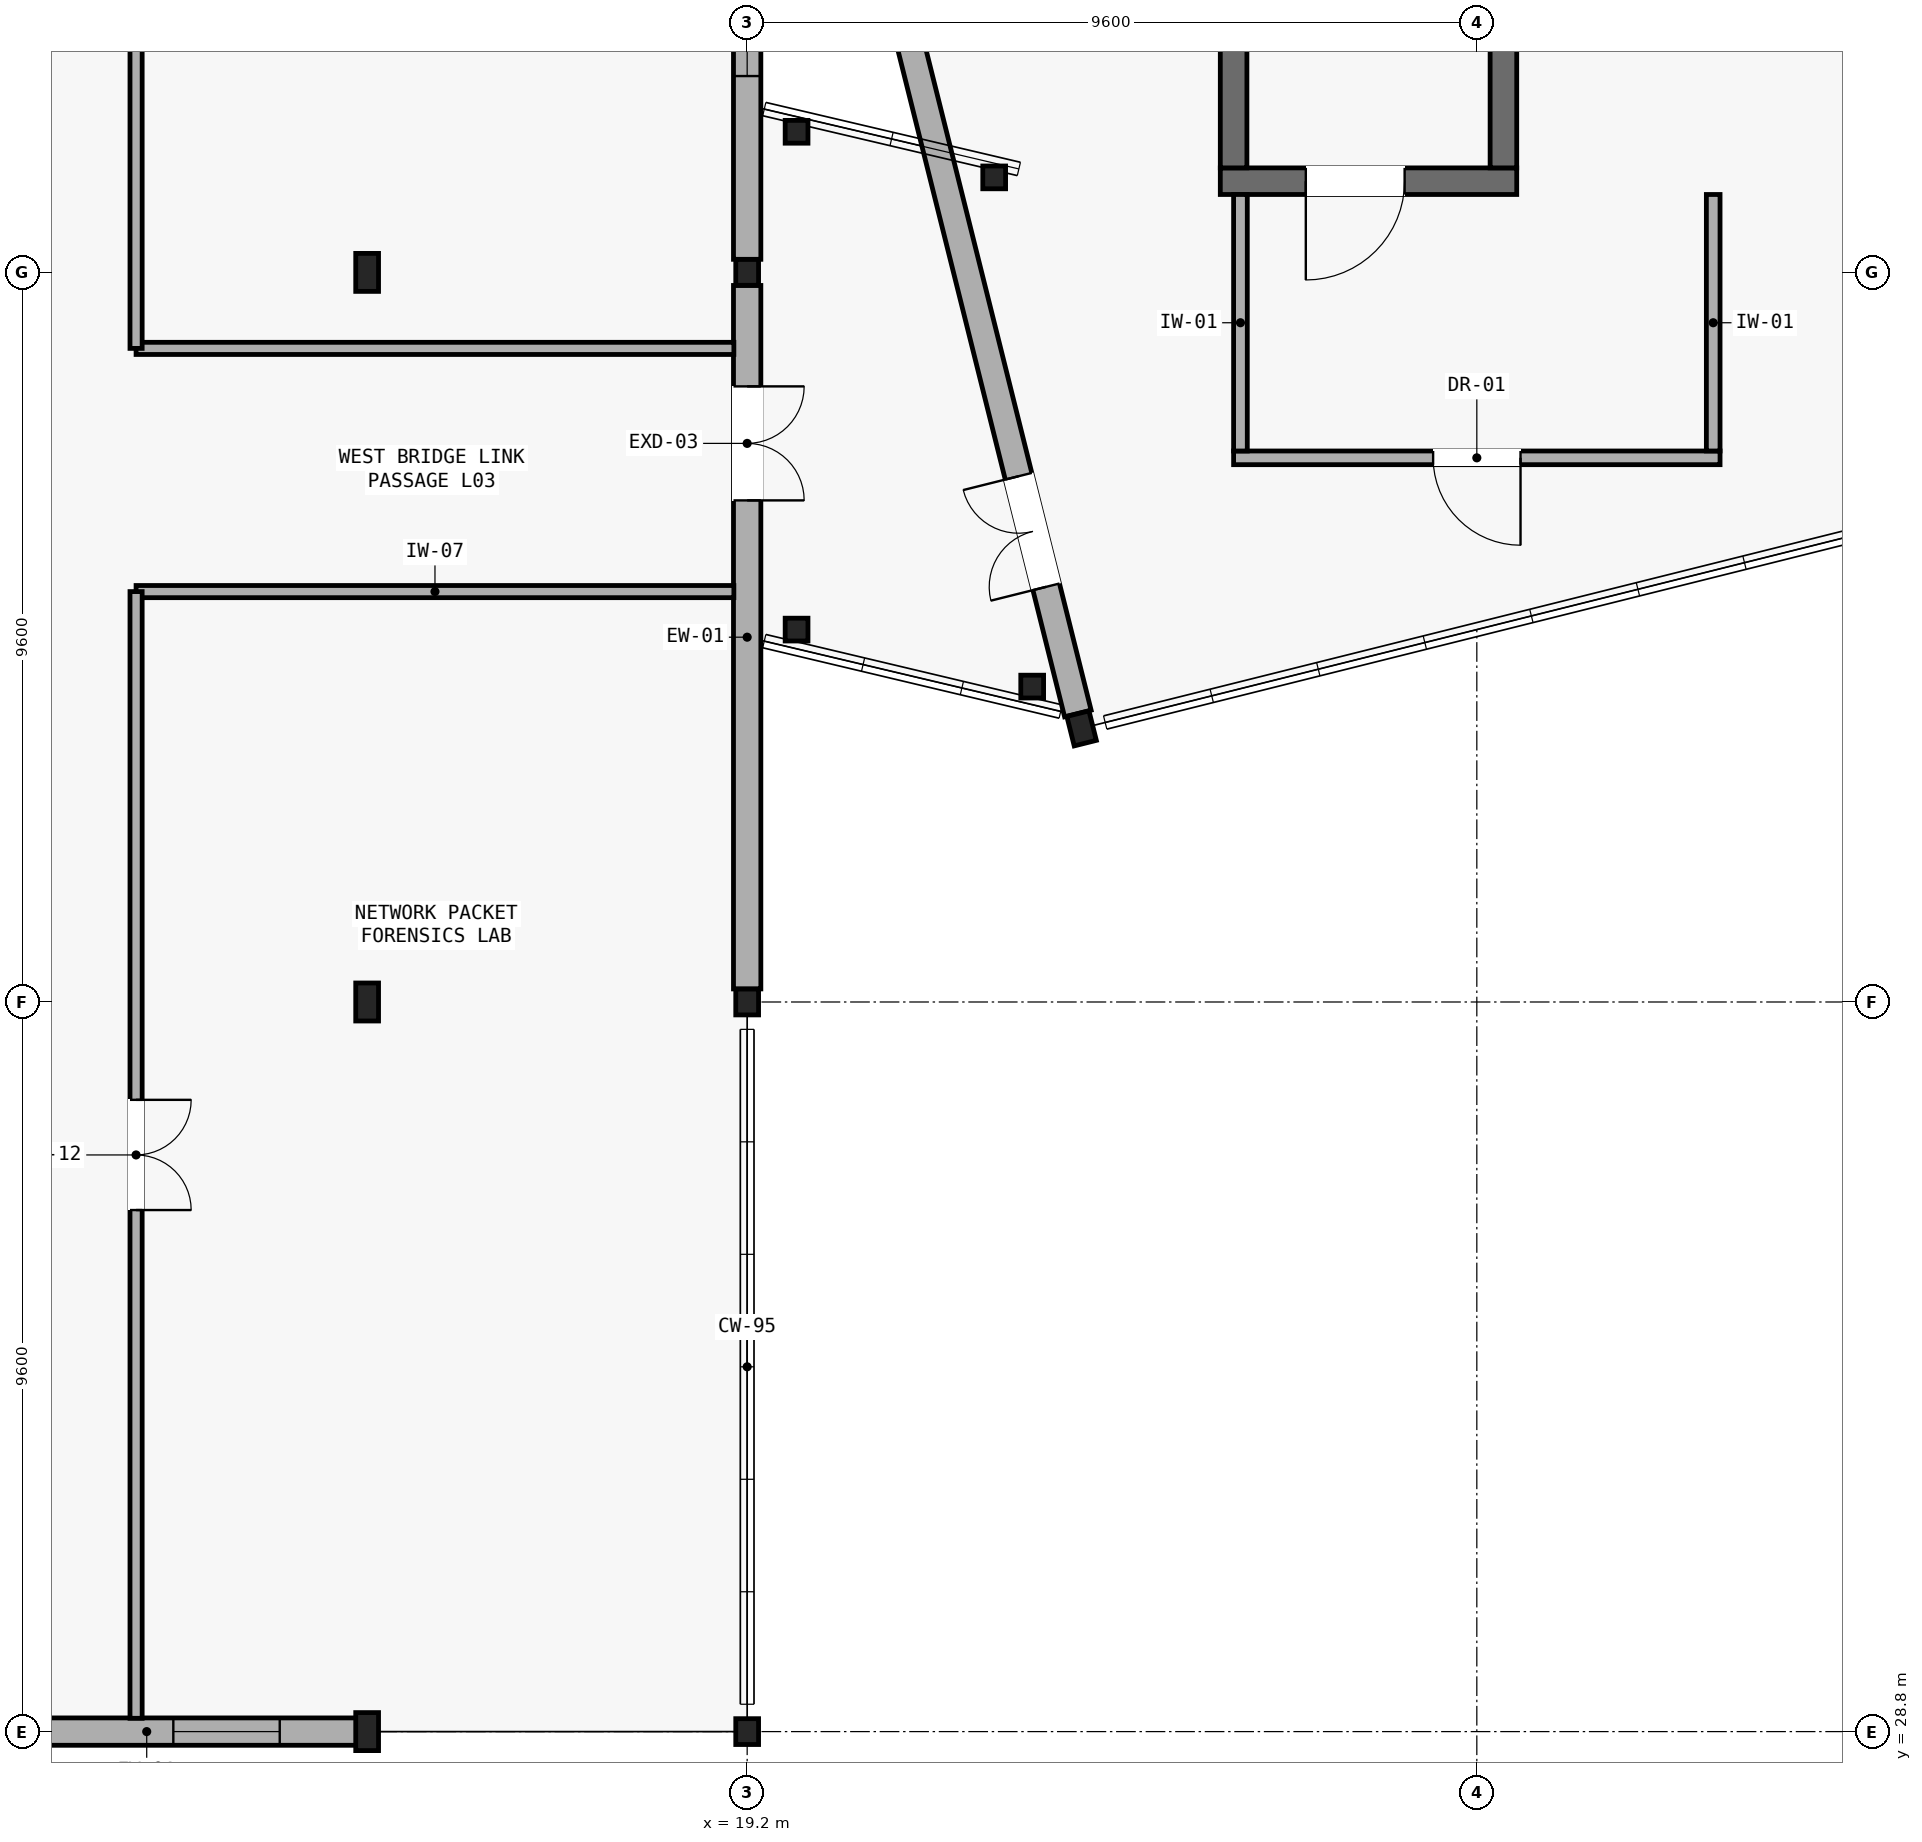
"""IFC4 building model, lengths in metres.
Left out: names, types, materials, properties, quantities, classifications, styles, units other than length and angle.
Written with IfcOpenShell. Run it as: python <this file> out.ifc"""

import sys

from ifc_helpers import new_model, si_unit, direction, frame, frame_2d, origin, origin_2d, place, context, subcontext, project, spatial, rectangle, i_section, extrude, element, fill, save


model = new_model("IFC4")
c1 = context("Model", 3, precision=1e-05, world=origin(), true_north=direction((0.0, 1.0)))
c2 = subcontext(c1, "Body", "Model", "MODEL_VIEW")
j1 = project(units=[si_unit("LENGTHUNIT", "METRE"), si_unit("PLANEANGLEUNIT", "RADIAN")], contexts=[c1])
p1 = place(None, origin())
s1 = spatial("IfcSite", under=j1, at=p1, CompositionType="ELEMENT")
p2 = place(p1, origin())
s2 = spatial("IfcBuilding", under=s1, at=p2, CompositionType="ELEMENT")
p3 = place(p2, frame((0.0, 0.0, 13.65)))
s3 = spatial("IfcBuildingStorey", under=s2, at=p3, CompositionType="ELEMENT", Elevation=13.65)
for number, where, z_axis, x_axis in (
    (1, (19.85, 49.85, 0.0), (0.0, 0.0, 1.0), (1.0, 0.0, 0.0)),
    (2, (19.85, 43.3, 0.0), (0.0, 0.0, 1.0), (1.0, 0.0, 0.0)),
    (3, (22.45, 49.25, 0.0), (0.0, 0.0, 1.0), (1.0, 0.0, 0.0)),
    (4, (22.95, 42.55, 0.0), (0.0, 0.0, 1.0), (1.0, 0.0, 0.0)),
):
    element("IfcColumn", number, at=place(p3, frame(where, z_axis=z_axis, x_axis=x_axis)), inside=s3, PredefinedType="COLUMN", context=c2, shape_type="SweptSolid", body=[
        extrude(i_section(OverallWidth=0.3, OverallDepth=0.3, WebThickness=0.011, FlangeThickness=0.019, FilletRadius=0.027, at=origin_2d()), origin(), (0.0, 0.0, 1.0), 4.2),
    ])
p4 = place(p3, frame((19.2, 28.8, 0.0), z_axis=(0.0, 0.0, 1.0), x_axis=(1.0, 0.0, 0.0)))
e5 = element("IfcColumn", 5, at=p4, inside=s3, PredefinedType="COLUMN", context=c2, shape_type="SweptSolid", body=[
    extrude(i_section(OverallWidth=0.3, OverallDepth=0.34, WebThickness=0.012, FlangeThickness=0.021, FilletRadius=0.027, at=origin_2d()), origin(), (0.0, 0.0, 1.0), 4.2),
])
p5 = place(p3, frame((14.2, 28.8, 0.0), z_axis=(0.0, 0.0, 1.0), x_axis=(1.0, 0.0, 0.0)))
e6 = element("IfcColumn", 6, at=p5, inside=s3, PredefinedType="COLUMN", context=c2, shape_type="SweptSolid", body=[
    extrude(i_section(OverallWidth=0.3, OverallDepth=0.5, WebThickness=0.014, FlangeThickness=0.028, FilletRadius=0.027, at=origin_2d()), origin(), (0.0, 0.0, 1.0), 4.2),
])
p6 = place(p3, frame((19.2, 38.4, 0.0), z_axis=(0.0, 0.0, 1.0), x_axis=(1.0, 0.0, 0.0)))
e7 = element("IfcColumn", 7, at=p6, inside=s3, PredefinedType="COLUMN", context=c2, shape_type="SweptSolid", body=[
    extrude(i_section(OverallWidth=0.3, OverallDepth=0.34, WebThickness=0.012, FlangeThickness=0.021, FilletRadius=0.027, at=origin_2d()), origin(), (0.0, 0.0, 1.0), 4.2),
])
p7 = place(p3, frame((14.2, 38.4, 0.0), z_axis=(0.0, 0.0, 1.0), x_axis=(1.0, 0.0, 0.0)))
e8 = element("IfcColumn", 8, at=p7, inside=s3, PredefinedType="COLUMN", context=c2, shape_type="SweptSolid", body=[
    extrude(i_section(OverallWidth=0.3, OverallDepth=0.5, WebThickness=0.014, FlangeThickness=0.028, FilletRadius=0.027, at=origin_2d()), origin(), (0.0, 0.0, 1.0), 4.2),
])
p8 = place(p3, frame((19.2, 48.0, 0.0), z_axis=(0.0, 0.0, 1.0), x_axis=(1.0, 0.0, 0.0)))
e9 = element("IfcColumn", 9, at=p8, inside=s3, PredefinedType="COLUMN", context=c2, shape_type="SweptSolid", body=[
    extrude(i_section(OverallWidth=0.3, OverallDepth=0.34, WebThickness=0.012, FlangeThickness=0.021, FilletRadius=0.027, at=origin_2d()), origin(), (0.0, 0.0, 1.0), 4.2),
])
p9 = place(p3, frame((14.2, 48.0, 0.0), z_axis=(0.0, 0.0, 1.0), x_axis=(1.0, 0.0, 0.0)))
e10 = element("IfcColumn", 10, at=p9, inside=s3, PredefinedType="COLUMN", context=c2, shape_type="SweptSolid", body=[
    extrude(i_section(OverallWidth=0.3, OverallDepth=0.5, WebThickness=0.014, FlangeThickness=0.028, FilletRadius=0.027, at=origin_2d()), origin(), (0.0, 0.0, 1.0), 4.2),
])
p10 = place(p3, frame((23.6, 42.0, 0.0), z_axis=(0.0, 0.0, 1.0), x_axis=(0.970142500145, 0.242535625038, 0.0)))
e11 = element("IfcColumn", 11, at=p10, inside=s3, PredefinedType="COLUMN", context=c2, shape_type="SweptSolid", body=[
    extrude(i_section(OverallWidth=0.3, OverallDepth=0.4, WebThickness=0.013, FlangeThickness=0.024, FilletRadius=0.027, at=origin_2d()), origin(), (0.0, 0.0, 1.0), 4.2),
])
p11 = place(p3, frame((19.2, 38.572, 0.0), z_axis=(0.0, 0.0, 1.0), x_axis=(0.0, 1.0, 0.0)))
e12 = element("IfcWall", 12, at=p11, inside=s3, PredefinedType="SOLIDWALL", context=c2, shape_type="SweptSolid", body=[
    extrude(rectangle(XDim=9.256, YDim=0.36, at=frame_2d((4.628, 0.0))), origin(), (0.0, 0.0, 1.0), 3.505),
])
p12 = place(p11, frame((6.428, 0.0, 0.0)))
e13 = element("IfcOpeningElement", 13, at=p12, cuts=e12, PredefinedType="OPENING", context=c2, shape_type="SweptSolid", body=[
    extrude(rectangle(XDim=1.5, YDim=2.2, at=frame_2d((0.75, 1.1))), frame((0.0, 0.19, 0.0), z_axis=(0.0, -1.0, 0.0), x_axis=(1.0, 0.0, 0.0)), (0.0, 0.0, 1.0), 0.38),
])
p13 = place(p3, frame((19.2, 48.172, 0.0), z_axis=(0.0, 0.0, 1.0), x_axis=(0.0, 1.0, 0.0)))
e14 = element("IfcWall", 14, at=p13, inside=s3, PredefinedType="SOLIDWALL", context=c2, shape_type="SweptSolid", body=[
    extrude(rectangle(XDim=9.256, YDim=0.36, at=frame_2d((4.628, 0.0))), origin(), (0.0, 0.0, 1.0), 3.505),
])
p14 = place(p13, frame((2.411, 0.0, 0.9)))
e15 = element("IfcOpeningElement", 15, at=p14, cuts=e14, PredefinedType="OPENING", context=c2, shape_type="SweptSolid", body=[
    extrude(rectangle(XDim=1.5, YDim=1.55, at=frame_2d((0.75, 0.775))), frame((0.0, 0.19, 0.0), z_axis=(0.0, -1.0, 0.0), x_axis=(1.0, 0.0, 0.0)), (0.0, 0.0, 1.0), 0.38),
])
p15 = place(p13, frame((5.345, 0.0, 0.9)))
e16 = element("IfcOpeningElement", 16, at=p15, cuts=e14, PredefinedType="OPENING", context=c2, shape_type="SweptSolid", body=[
    extrude(rectangle(XDim=1.5, YDim=1.55, at=frame_2d((0.75, 0.775))), frame((0.0, 0.19, 0.0), z_axis=(0.0, -1.0, 0.0), x_axis=(1.0, 0.0, 0.0)), (0.0, 0.0, 1.0), 0.38),
])
p16 = place(p3, frame((8.409, 28.8, 0.0), z_axis=(0.0, 0.0, 1.0), x_axis=(1.0, 0.0, 0.0)))
e17 = element("IfcWall", 17, at=p16, inside=s3, PredefinedType="SOLIDWALL", context=c2, shape_type="SweptSolid", body=[
    extrude(rectangle(XDim=5.781, YDim=0.36, at=frame_2d((2.891, 0.0))), origin(), (0.0, 0.0, 1.0), 3.635),
])
p17 = place(p16, frame((3.241, 0.0, 0.9)))
e18 = element("IfcOpeningElement", 18, at=p17, cuts=e17, PredefinedType="OPENING", context=c2, shape_type="SweptSolid", body=[
    extrude(rectangle(XDim=1.4, YDim=1.15, at=frame_2d((0.7, 0.575))), frame((0.0, 0.19, 0.0), z_axis=(0.0, -1.0, 0.0), x_axis=(1.0, 0.0, 0.0)), (0.0, 0.0, 1.0), 0.38),
])
p18 = place(p3, frame((23.551, 42.196, 0.0), z_axis=(0.0, 0.0, 1.0), x_axis=(-0.242535625036, 0.970142500145, 0.0)))
e19 = element("IfcWall", 19, at=p18, inside=s3, PredefinedType="SOLIDWALL", context=c2, shape_type="SweptSolid", body=[
    extrude(rectangle(XDim=13.996, YDim=0.36, at=frame_2d((6.998, 0.0))), origin(), (0.0, 0.0, 1.0), 3.405),
])
p19 = place(p18, frame((1.718, 0.0, 0.0)))
e20 = element("IfcOpeningElement", 20, at=p19, cuts=e19, PredefinedType="OPENING", context=c2, shape_type="SweptSolid", body=[
    extrude(rectangle(XDim=1.5, YDim=2.2, at=frame_2d((0.75, 1.1))), frame((0.0, 0.19, 0.0), z_axis=(0.0, -1.0, 0.0), x_axis=(1.0, 0.0, 0.0)), (0.0, 0.0, 1.0), 0.38),
])
p20 = place(p3, frame((25.425, 49.2, 0.0), z_axis=(0.0, 0.0, 1.0), x_axis=(1.0, 0.0, 0.0)))
e21 = element("IfcWall", 21, at=p20, inside=s3, PredefinedType="SHEAR", context=c2, shape_type="SweptSolid", body=[
    extrude(rectangle(XDim=3.9, YDim=0.35, at=frame_2d((1.95, 0.0))), origin(), (0.0, 0.0, 1.0), 3.98),
])
p21 = place(p20, frame((1.125, 0.0, 0.0)))
e22 = element("IfcOpeningElement", 22, at=p21, cuts=e21, PredefinedType="OPENING", context=c2, shape_type="SweptSolid", body=[
    extrude(rectangle(XDim=1.3, YDim=2.15, at=frame_2d((0.65, 1.075))), frame((0.0, 0.185, 0.0), z_axis=(0.0, -1.0, 0.0), x_axis=(1.0, 0.0, 0.0)), (0.0, 0.0, 1.0), 0.37),
])
for number, where, z_axis, x_axis in (
    (23, (25.6, 49.375, 0.0), (0.0, 0.0, 1.0), (0.0, 1.0, 0.0)),
    (24, (29.15, 49.375, 0.0), (0.0, 0.0, 1.0), (0.0, 1.0, 0.0)),
):
    element("IfcWall", number, at=place(p3, frame(where, z_axis=z_axis, x_axis=x_axis)), inside=s3, PredefinedType="SHEAR", context=c2, shape_type="SweptSolid", body=[
        extrude(rectangle(XDim=7.6, YDim=0.35, at=frame_2d((3.8, 0.0))), origin(), (0.0, 0.0, 1.0), 3.98),
    ])
p22 = place(p3, frame((25.6, 45.56, 0.0), z_axis=(0.0, 0.0, 1.0), x_axis=(1.0, 0.0, 0.0)))
e25 = element("IfcWall", 25, at=p22, inside=s3, PredefinedType="PARTITIONING", context=c2, shape_type="SweptSolid", body=[
    extrude(rectangle(XDim=6.4, YDim=0.18, at=frame_2d((3.2, 0.0))), origin(), (0.0, 0.0, 1.0), 3.6),
])
p23 = place(p22, frame((2.625, 0.0, 0.0)))
e26 = element("IfcOpeningElement", 26, at=p23, cuts=e25, PredefinedType="OPENING", context=c2, shape_type="SweptSolid", body=[
    extrude(rectangle(XDim=1.15, YDim=2.15, at=frame_2d((0.575, 1.075))), frame((0.0, 0.1, 0.0), z_axis=(0.0, -1.0, 0.0), x_axis=(1.0, 0.0, 0.0)), (0.0, 0.0, 1.0), 0.2),
])
for number, where, z_axis, x_axis in (
    (27, (25.69, 45.65, 0.0), (0.0, 0.0, 1.0), (0.0, 1.0, 0.0)),
    (28, (31.91, 45.65, 0.0), (0.0, 0.0, 1.0), (0.0, 1.0, 0.0)),
):
    element("IfcWall", number, at=place(p3, frame(where, z_axis=z_axis, x_axis=x_axis)), inside=s3, PredefinedType="PARTITIONING", context=c2, shape_type="SweptSolid", body=[
        extrude(rectangle(XDim=3.375, YDim=0.18, at=frame_2d((1.688, 0.0))), origin(), (0.0, 0.0, 1.0), 3.98),
    ])
p24 = place(p3, frame((19.025, 43.8, 0.0), z_axis=(0.0, 0.0, 1.0), x_axis=(-1.0, 0.0, 0.0)))
e29 = element("IfcWall", 29, at=p24, inside=s3, PredefinedType="PARTITIONING", context=c2, shape_type="SweptSolid", body=[
    extrude(rectangle(XDim=7.865, YDim=0.16, at=frame_2d((3.933, 0.0))), origin(), (0.0, 0.0, 1.0), 3.98),
])
p25 = place(p3, frame((11.16, 43.8, 0.0), z_axis=(0.0, 0.0, 1.0), x_axis=(0.0, -1.0, 0.0)))
e30 = element("IfcWall", 30, at=p25, inside=s3, PredefinedType="PARTITIONING", context=c2, shape_type="SweptSolid", body=[
    extrude(rectangle(XDim=14.825, YDim=0.16, at=frame_2d((7.413, 0.0))), origin(), (0.0, 0.0, 1.0), 3.6),
])
p26 = place(p25, frame((6.688, 0.0, 0.0)))
e31 = element("IfcOpeningElement", 31, at=p26, cuts=e30, PredefinedType="OPENING", context=c2, shape_type="SweptSolid", body=[
    extrude(rectangle(XDim=1.45, YDim=2.15, at=frame_2d((0.725, 1.075))), frame((0.0, 0.09, 0.0), z_axis=(0.0, -1.0, 0.0), x_axis=(1.0, 0.0, 0.0)), (0.0, 0.0, 1.0), 0.18),
])
p27 = place(p3, frame((11.16, 47.0, 0.0), z_axis=(0.0, 0.0, 1.0), x_axis=(1.0, 0.0, 0.0)))
e32 = element("IfcWall", 32, at=p27, inside=s3, PredefinedType="PARTITIONING", context=c2, shape_type="SweptSolid", body=[
    extrude(rectangle(XDim=7.865, YDim=0.16, at=frame_2d((3.933, 0.0))), origin(), (0.0, 0.0, 1.0), 3.98),
])
p28 = place(p3, frame((11.16, 82.6, 0.0), z_axis=(0.0, 0.0, 1.0), x_axis=(0.0, -1.0, 0.0)))
e33 = element("IfcWall", 33, at=p28, inside=s3, PredefinedType="PARTITIONING", context=c2, shape_type="SweptSolid", body=[
    extrude(rectangle(XDim=35.6, YDim=0.16, at=frame_2d((17.8, 0.0))), origin(), (0.0, 0.0, 1.0), 3.6),
])
p29 = place(p28, frame((17.075, 0.0, 0.0)))
e34 = element("IfcOpeningElement", 34, at=p29, cuts=e33, PredefinedType="OPENING", context=c2, shape_type="SweptSolid", body=[
    extrude(rectangle(XDim=1.45, YDim=2.15, at=frame_2d((0.725, 1.075))), frame((0.0, 0.09, 0.0), z_axis=(0.0, -1.0, 0.0), x_axis=(1.0, 0.0, 0.0)), (0.0, 0.0, 1.0), 0.18),
])
p30 = place(p3, frame((32.74, 59.041, 0.0), z_axis=(0.0, 0.0, 1.0), x_axis=(0.242525471141, -0.970145038563, 0.0)))
e35 = element("IfcWall", 35, at=p30, inside=s3, PredefinedType="PARTITIONING", context=c2, shape_type="SweptSolid", body=[
    extrude(rectangle(XDim=11.315, YDim=0.12, at=frame_2d((5.657, 0.0))), origin(), (0.0, 0.0, 1.0), 3.98),
])
p31 = place(p12, frame((1.5, 0.0, 0.0), z_axis=(0.0, 0.0, 1.0), x_axis=(-1.0, 0.0, 0.0)))
e36 = element("IfcDoor", 36, at=p31, inside=s3, OperationType="SINGLE_SWING_LEFT", PredefinedType="DOOR", context=c2, shape_type="SweptSolid", body=[
    extrude(rectangle(XDim=1.5, YDim=2.2, at=frame_2d((0.75, 1.1))), frame((0.0, 0.025, 0.0), z_axis=(0.0, -1.0, 0.0), x_axis=(1.0, 0.0, 0.0)), (0.0, 0.0, 1.0), 0.05),
])
fill(e13, e36)
p32 = place(p14, origin())
e37 = element("IfcWindow", 37, at=p32, inside=s3, PartitioningType="SINGLE_PANEL", PredefinedType="WINDOW", context=c2, shape_type="SweptSolid", body=[
    extrude(rectangle(XDim=1.5, YDim=1.55, at=frame_2d((0.75, 0.775))), frame((0.0, 0.03, 0.0), z_axis=(0.0, -1.0, 0.0), x_axis=(1.0, 0.0, 0.0)), (0.0, 0.0, 1.0), 0.06),
])
fill(e15, e37)
p33 = place(p17, origin())
e38 = element("IfcWindow", 38, at=p33, inside=s3, PartitioningType="SINGLE_PANEL", PredefinedType="WINDOW", context=c2, shape_type="SweptSolid", body=[
    extrude(rectangle(XDim=1.4, YDim=1.15, at=frame_2d((0.7, 0.575))), frame((0.0, 0.03, 0.0), z_axis=(0.0, -1.0, 0.0), x_axis=(1.0, 0.0, 0.0)), (0.0, 0.0, 1.0), 0.06),
])
fill(e18, e38)
p34 = place(p19, origin())
e39 = element("IfcDoor", 39, at=p34, inside=s3, OperationType="SINGLE_SWING_LEFT", PredefinedType="DOOR", context=c2, shape_type="SweptSolid", body=[
    extrude(rectangle(XDim=1.5, YDim=2.2, at=frame_2d((0.75, 1.1))), frame((0.0, 0.025, 0.0), z_axis=(0.0, -1.0, 0.0), x_axis=(1.0, 0.0, 0.0)), (0.0, 0.0, 1.0), 0.05),
])
fill(e20, e39)
p35 = place(p21, frame((1.3, 0.0, 0.0), z_axis=(0.0, 0.0, 1.0), x_axis=(-1.0, 0.0, 0.0)))
e40 = element("IfcDoor", 40, at=p35, inside=s3, OperationType="SINGLE_SWING_LEFT", PredefinedType="DOOR", context=c2, shape_type="SweptSolid", body=[
    extrude(rectangle(XDim=1.3, YDim=2.15, at=frame_2d((0.65, 1.075))), frame((0.0, 0.025, 0.0), z_axis=(0.0, -1.0, 0.0), x_axis=(1.0, 0.0, 0.0)), (0.0, 0.0, 1.0), 0.05),
])
fill(e22, e40)
p36 = place(p23, frame((1.15, 0.0, 0.0), z_axis=(0.0, 0.0, 1.0), x_axis=(-1.0, 0.0, 0.0)))
e41 = element("IfcDoor", 41, at=p36, inside=s3, OperationType="SINGLE_SWING_RIGHT", PredefinedType="DOOR", context=c2, shape_type="SweptSolid", body=[
    extrude(rectangle(XDim=1.15, YDim=2.15, at=frame_2d((0.575, 1.075))), frame((0.0, 0.025, 0.0), z_axis=(0.0, -1.0, 0.0), x_axis=(1.0, 0.0, 0.0)), (0.0, 0.0, 1.0), 0.05),
])
fill(e26, e41)
p37 = place(p26, origin())
e42 = element("IfcDoor", 42, at=p37, inside=s3, OperationType="DOUBLE_DOOR_SINGLE_SWING", PredefinedType="DOOR", context=c2, shape_type="SweptSolid", body=[
    extrude(rectangle(XDim=1.45, YDim=2.15, at=frame_2d((0.725, 1.075))), frame((0.0, 0.025, 0.0), z_axis=(0.0, -1.0, 0.0), x_axis=(1.0, 0.0, 0.0)), (0.0, 0.0, 1.0), 0.05),
])
fill(e31, e42)
save(model, sys.argv[1])
